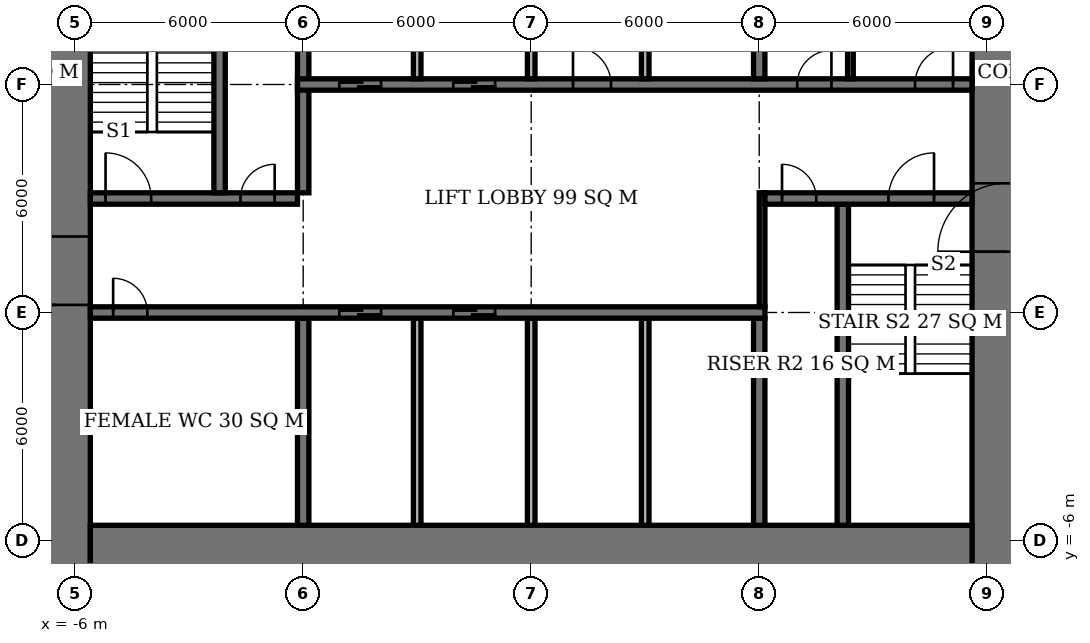
"""IFC4 building model, lengths in metres.
Left out: names, types, materials, properties, quantities, classifications, styles, units other than length and angle.
Written with IfcOpenShell. Run it as: python <this file> out.ifc"""

import sys

from ifc_helpers import new_model, si_unit, direction, frame, frame_2d, origin, place, context, subcontext, project, spatial, rectangle, extrude, element, fill, save


model = new_model("IFC4")
c1 = context("Model", 3, precision=1e-05, world=origin(), true_north=direction((0.0, 1.0)))
c2 = subcontext(c1, "Body", "Model", "MODEL_VIEW")
j1 = project(units=[si_unit("LENGTHUNIT", "METRE"), si_unit("PLANEANGLEUNIT", "RADIAN")], contexts=[c1])
p1 = place(None, origin())
s1 = spatial("IfcSite", under=j1, at=p1, CompositionType="ELEMENT")
p2 = place(p1, origin())
s2 = spatial("IfcBuilding", under=s1, at=p2, CompositionType="ELEMENT")
p3 = place(p2, frame((0.0, 0.0, 144.5)))
s3 = spatial("IfcBuildingStorey", under=s2, at=p3, CompositionType="ELEMENT", Elevation=144.5)
p4 = place(p3, frame((-5.6, -6.6, 0.0), z_axis=(0.0, 0.0, 1.0), x_axis=(1.0, 0.0, 0.0)))
e1 = element("IfcWall", 1, at=p4, inside=s3, PredefinedType="SHEAR", context=c2, shape_type="SweptSolid", body=[
    extrude(rectangle(XDim=23.2, YDim=2.0, at=frame_2d((11.6, 0.0))), origin(), (0.0, 0.0, 1.0), 3.9),
])
p5 = place(p3, frame((-6.5, -7.6, 0.0), z_axis=(0.0, 0.0, 1.0), x_axis=(0.0, 1.0, 0.0)))
e2 = element("IfcWall", 2, at=p5, inside=s3, PredefinedType="SHEAR", context=c2, shape_type="SweptSolid", body=[
    extrude(rectangle(XDim=21.2, YDim=1.8, at=frame_2d((10.6, 0.0))), origin(), (0.0, 0.0, 1.0), 3.9),
])
p6 = place(p5, frame((7.8, 0.0, 0.0)))
e3 = element("IfcOpeningElement", 3, at=p6, cuts=e2, PredefinedType="OPENING", context=c2, shape_type="SweptSolid", body=[
    extrude(rectangle(XDim=1.8, YDim=2.4, at=frame_2d((0.9, 1.2))), frame((0.0, 0.91, 0.0), z_axis=(0.0, -1.0, 0.0), x_axis=(1.0, 0.0, 0.0)), (0.0, 0.0, 1.0), 1.82),
])
p7 = place(p3, frame((18.5, -7.6, 0.0), z_axis=(0.0, 0.0, 1.0), x_axis=(0.0, 1.0, 0.0)))
e4 = element("IfcWall", 4, at=p7, inside=s3, PredefinedType="SHEAR", context=c2, shape_type="SweptSolid", body=[
    extrude(rectangle(XDim=21.2, YDim=1.8, at=frame_2d((10.6, 0.0))), origin(), (0.0, 0.0, 1.0), 3.9),
])
p8 = place(p7, frame((9.2, 0.0, 0.0)))
e5 = element("IfcOpeningElement", 5, at=p8, cuts=e4, PredefinedType="OPENING", context=c2, shape_type="SweptSolid", body=[
    extrude(rectangle(XDim=1.8, YDim=2.4, at=frame_2d((0.9, 1.2))), frame((0.0, 0.91, 0.0), z_axis=(0.0, -1.0, 0.0), x_axis=(1.0, 0.0, 0.0)), (0.0, 0.0, 1.0), 1.82),
])
p9 = place(p3, frame((-5.6, 0.0, 0.0), z_axis=(0.0, 0.0, 1.0), x_axis=(1.0, 0.0, 0.0)))
e6 = element("IfcWall", 6, at=p9, inside=s3, PredefinedType="SHEAR", context=c2, shape_type="SweptSolid", body=[
    extrude(rectangle(XDim=17.75, YDim=0.3, at=frame_2d((8.875, 0.0))), origin(), (0.0, 0.0, 1.0), 3.9),
])
p10 = place(p9, frame((0.6, 0.0, 0.0)))
e7 = element("IfcOpeningElement", 7, at=p10, cuts=e6, PredefinedType="OPENING", context=c2, shape_type="SweptSolid", body=[
    extrude(rectangle(XDim=0.9, YDim=2.1, at=frame_2d((0.45, 1.05))), frame((0.0, 0.16, 0.0), z_axis=(0.0, -1.0, 0.0), x_axis=(1.0, 0.0, 0.0)), (0.0, 0.0, 1.0), 0.32),
])
p11 = place(p9, frame((6.55, 0.0, 0.0)))
e8 = element("IfcOpeningElement", 8, at=p11, cuts=e6, PredefinedType="OPENING", context=c2, shape_type="SweptSolid", body=[
    extrude(rectangle(XDim=1.1, YDim=2.1, at=frame_2d((0.55, 1.05))), frame((0.0, 0.16, 0.0), z_axis=(0.0, -1.0, 0.0), x_axis=(1.0, 0.0, 0.0)), (0.0, 0.0, 1.0), 0.32),
])
p12 = place(p9, frame((9.55, 0.0, 0.0)))
e9 = element("IfcOpeningElement", 9, at=p12, cuts=e6, PredefinedType="OPENING", context=c2, shape_type="SweptSolid", body=[
    extrude(rectangle(XDim=1.1, YDim=2.1, at=frame_2d((0.55, 1.05))), frame((0.0, 0.16, 0.0), z_axis=(0.0, -1.0, 0.0), x_axis=(1.0, 0.0, 0.0)), (0.0, 0.0, 1.0), 0.32),
])
p13 = place(p3, frame((-5.6, 3.0, 0.0), z_axis=(0.0, 0.0, 1.0), x_axis=(1.0, 0.0, 0.0)))
e10 = element("IfcWall", 10, at=p13, inside=s3, PredefinedType="SHEAR", context=c2, shape_type="SweptSolid", body=[
    extrude(rectangle(XDim=5.45, YDim=0.3, at=frame_2d((2.725, 0.0))), origin(), (0.0, 0.0, 1.0), 3.9),
])
p14 = place(p13, frame((0.4, 0.0, 0.0)))
e11 = element("IfcOpeningElement", 11, at=p14, cuts=e10, PredefinedType="OPENING", context=c2, shape_type="SweptSolid", body=[
    extrude(rectangle(XDim=1.2, YDim=2.1, at=frame_2d((0.6, 1.05))), frame((0.0, 0.16, 0.0), z_axis=(0.0, -1.0, 0.0), x_axis=(1.0, 0.0, 0.0)), (0.0, 0.0, 1.0), 0.32),
])
p15 = place(p13, frame((3.95, 0.0, 0.0)))
e12 = element("IfcOpeningElement", 12, at=p15, cuts=e10, PredefinedType="OPENING", context=c2, shape_type="SweptSolid", body=[
    extrude(rectangle(XDim=0.9, YDim=2.1, at=frame_2d((0.45, 1.05))), frame((0.0, 0.16, 0.0), z_axis=(0.0, -1.0, 0.0), x_axis=(1.0, 0.0, 0.0)), (0.0, 0.0, 1.0), 0.32),
])
p16 = place(p3, frame((12.15, 3.0, 0.0), z_axis=(0.0, 0.0, 1.0), x_axis=(1.0, 0.0, 0.0)))
e13 = element("IfcWall", 13, at=p16, inside=s3, PredefinedType="SHEAR", context=c2, shape_type="SweptSolid", body=[
    extrude(rectangle(XDim=5.45, YDim=0.3, at=frame_2d((2.725, 0.0))), origin(), (0.0, 0.0, 1.0), 3.9),
])
p17 = place(p16, frame((3.25, 0.0, 0.0)))
e14 = element("IfcOpeningElement", 14, at=p17, cuts=e13, PredefinedType="OPENING", context=c2, shape_type="SweptSolid", body=[
    extrude(rectangle(XDim=1.2, YDim=2.1, at=frame_2d((0.6, 1.05))), frame((0.0, 0.16, 0.0), z_axis=(0.0, -1.0, 0.0), x_axis=(1.0, 0.0, 0.0)), (0.0, 0.0, 1.0), 0.32),
])
p18 = place(p16, frame((0.45, 0.0, 0.0)))
e15 = element("IfcOpeningElement", 15, at=p18, cuts=e13, PredefinedType="OPENING", context=c2, shape_type="SweptSolid", body=[
    extrude(rectangle(XDim=0.9, YDim=2.1, at=frame_2d((0.45, 1.05))), frame((0.0, 0.16, 0.0), z_axis=(0.0, -1.0, 0.0), x_axis=(1.0, 0.0, 0.0)), (0.0, 0.0, 1.0), 0.32),
])
p19 = place(p3, frame((-0.15, 6.0, 0.0), z_axis=(0.0, 0.0, 1.0), x_axis=(1.0, 0.0, 0.0)))
e16 = element("IfcWall", 16, at=p19, inside=s3, PredefinedType="SHEAR", context=c2, shape_type="SweptSolid", body=[
    extrude(rectangle(XDim=17.75, YDim=0.3, at=frame_2d((8.875, 0.0))), origin(), (0.0, 0.0, 1.0), 3.9),
])
p20 = place(p19, frame((13.15, 0.0, 0.0)))
e17 = element("IfcOpeningElement", 17, at=p20, cuts=e16, PredefinedType="OPENING", context=c2, shape_type="SweptSolid", body=[
    extrude(rectangle(XDim=0.9, YDim=2.1, at=frame_2d((0.45, 1.05))), frame((0.0, 0.16, 0.0), z_axis=(0.0, -1.0, 0.0), x_axis=(1.0, 0.0, 0.0)), (0.0, 0.0, 1.0), 0.32),
])
p21 = place(p19, frame((16.25, 0.0, 0.0)))
e18 = element("IfcOpeningElement", 18, at=p21, cuts=e16, PredefinedType="OPENING", context=c2, shape_type="SweptSolid", body=[
    extrude(rectangle(XDim=1.0, YDim=2.1, at=frame_2d((0.5, 1.05))), frame((0.0, 0.16, 0.0), z_axis=(0.0, -1.0, 0.0), x_axis=(1.0, 0.0, 0.0)), (0.0, 0.0, 1.0), 0.32),
])
p22 = place(p19, frame((7.25, 0.0, 0.0)))
e19 = element("IfcOpeningElement", 19, at=p22, cuts=e16, PredefinedType="OPENING", context=c2, shape_type="SweptSolid", body=[
    extrude(rectangle(XDim=1.0, YDim=2.1, at=frame_2d((0.5, 1.05))), frame((0.0, 0.16, 0.0), z_axis=(0.0, -1.0, 0.0), x_axis=(1.0, 0.0, 0.0)), (0.0, 0.0, 1.0), 0.32),
])
p23 = place(p19, frame((1.1, 0.0, 0.0)))
e20 = element("IfcOpeningElement", 20, at=p23, cuts=e16, PredefinedType="OPENING", context=c2, shape_type="SweptSolid", body=[
    extrude(rectangle(XDim=1.1, YDim=2.1, at=frame_2d((0.55, 1.05))), frame((0.0, 0.16, 0.0), z_axis=(0.0, -1.0, 0.0), x_axis=(1.0, 0.0, 0.0)), (0.0, 0.0, 1.0), 0.32),
])
p24 = place(p19, frame((4.1, 0.0, 0.0)))
e21 = element("IfcOpeningElement", 21, at=p24, cuts=e16, PredefinedType="OPENING", context=c2, shape_type="SweptSolid", body=[
    extrude(rectangle(XDim=1.1, YDim=2.1, at=frame_2d((0.55, 1.05))), frame((0.0, 0.16, 0.0), z_axis=(0.0, -1.0, 0.0), x_axis=(1.0, 0.0, 0.0)), (0.0, 0.0, 1.0), 0.32),
])
p25 = place(p3, frame((0.0, -5.6, 0.0), z_axis=(0.0, 0.0, 1.0), x_axis=(0.0, 1.0, 0.0)))
e22 = element("IfcWall", 22, at=p25, inside=s3, PredefinedType="SHEAR", context=c2, shape_type="SweptSolid", body=[
    extrude(rectangle(XDim=5.45, YDim=0.3, at=frame_2d((2.725, 0.0))), origin(), (0.0, 0.0, 1.0), 3.9),
])
p26 = place(p3, frame((0.0, 3.15, 0.0), z_axis=(0.0, 0.0, 1.0), x_axis=(0.0, 1.0, 0.0)))
e23 = element("IfcWall", 23, at=p26, inside=s3, PredefinedType="SHEAR", context=c2, shape_type="SweptSolid", body=[
    extrude(rectangle(XDim=8.45, YDim=0.3, at=frame_2d((4.225, 0.0))), origin(), (0.0, 0.0, 1.0), 3.9),
])
for number, where, z_axis, x_axis in (
    (24, (12.0, -5.6, 0.0), (0.0, 0.0, 1.0), (0.0, 1.0, 0.0)),
    (25, (12.0, 6.15, 0.0), (0.0, 0.0, 1.0), (0.0, 1.0, 0.0)),
):
    element("IfcWall", number, at=place(p3, frame(where, z_axis=z_axis, x_axis=x_axis)), inside=s3, PredefinedType="SHEAR", context=c2, shape_type="SweptSolid", body=[
        extrude(rectangle(XDim=5.45, YDim=0.3, at=frame_2d((2.725, 0.0))), origin(), (0.0, 0.0, 1.0), 3.9),
    ])
for number, where, z_axis, x_axis in (
    (26, (-2.2, 3.15, 0.0), (0.0, 0.0, 1.0), (0.0, 1.0, 0.0)),
    (27, (14.2, -5.6, 0.0), (0.0, 0.0, 1.0), (0.0, 1.0, 0.0)),
):
    element("IfcWall", number, at=place(p3, frame(where, z_axis=z_axis, x_axis=x_axis)), inside=s3, PredefinedType="SHEAR", context=c2, shape_type="SweptSolid", body=[
        extrude(rectangle(XDim=8.45, YDim=0.3, at=frame_2d((4.225, 0.0))), origin(), (0.0, 0.0, 1.0), 3.9),
    ])
for number, where, z_axis, x_axis in (
    (28, (3.0, 6.15, 0.0), (0.0, 0.0, 1.0), (0.0, 1.0, 0.0)),
    (29, (6.0, 6.15, 0.0), (0.0, 0.0, 1.0), (0.0, 1.0, 0.0)),
    (30, (9.0, 6.15, 0.0), (0.0, 0.0, 1.0), (0.0, 1.0, 0.0)),
    (31, (3.0, -5.6, 0.0), (0.0, 0.0, 1.0), (0.0, 1.0, 0.0)),
    (32, (6.0, -5.6, 0.0), (0.0, 0.0, 1.0), (0.0, 1.0, 0.0)),
    (33, (9.0, -5.6, 0.0), (0.0, 0.0, 1.0), (0.0, 1.0, 0.0)),
):
    element("IfcWall", number, at=place(p3, frame(where, z_axis=z_axis, x_axis=x_axis)), inside=s3, PredefinedType="SOLIDWALL", context=c2, shape_type="SweptSolid", body=[
        extrude(rectangle(XDim=5.45, YDim=0.2, at=frame_2d((2.725, 0.0))), origin(), (0.0, 0.0, 1.0), 3.9),
    ])
p27 = place(p3, frame((14.4, 6.15, 0.0), z_axis=(0.0, 0.0, 1.0), x_axis=(0.0, 1.0, 0.0)))
e34 = element("IfcWall", 34, at=p27, inside=s3, PredefinedType="PLUMBINGWALL", context=c2, shape_type="SweptSolid", body=[
    extrude(rectangle(XDim=5.45, YDim=0.15, at=frame_2d((2.725, 0.0))), origin(), (0.0, 0.0, 1.0), 3.65),
])
p28 = place(p3, frame((12.075, 0.15, 0.0), z_axis=(0.0, 0.0, 1.0), x_axis=(0.0, 1.0, 0.0)))
e35 = element("IfcWall", 35, at=p28, inside=s3, PredefinedType="PARTITIONING", context=c2, shape_type="SweptSolid", body=[
    extrude(rectangle(XDim=3.0, YDim=0.15, at=frame_2d((1.5, 0.0))), origin(), (0.0, 0.0, 1.0), 3.65),
])
p29 = place(p6, origin())
e36 = element("IfcDoor", 36, at=p29, inside=s3, OperationType="DOUBLE_DOOR_SINGLE_SWING", PredefinedType="DOOR", context=c2, shape_type="SweptSolid", body=[
    extrude(rectangle(XDim=1.8, YDim=2.4, at=frame_2d((0.9, 1.2))), frame((0.0, 0.025, 0.0), z_axis=(0.0, -1.0, 0.0), x_axis=(1.0, 0.0, 0.0)), (0.0, 0.0, 1.0), 0.05),
])
fill(e3, e36)
p30 = place(p8, origin())
e37 = element("IfcDoor", 37, at=p30, inside=s3, OperationType="DOUBLE_DOOR_SINGLE_SWING", PredefinedType="DOOR", context=c2, shape_type="SweptSolid", body=[
    extrude(rectangle(XDim=1.8, YDim=2.4, at=frame_2d((0.9, 1.2))), frame((0.0, 0.025, 0.0), z_axis=(0.0, -1.0, 0.0), x_axis=(1.0, 0.0, 0.0)), (0.0, 0.0, 1.0), 0.05),
])
fill(e5, e37)
p31 = place(p14, origin())
e38 = element("IfcDoor", 38, at=p31, inside=s3, OperationType="SINGLE_SWING_LEFT", PredefinedType="DOOR", context=c2, shape_type="SweptSolid", body=[
    extrude(rectangle(XDim=1.2, YDim=2.1, at=frame_2d((0.6, 1.05))), frame((0.0, 0.025, 0.0), z_axis=(0.0, -1.0, 0.0), x_axis=(1.0, 0.0, 0.0)), (0.0, 0.0, 1.0), 0.05),
])
fill(e11, e38)
p32 = place(p15, origin())
e39 = element("IfcDoor", 39, at=p32, inside=s3, OperationType="SINGLE_SWING_RIGHT", PredefinedType="DOOR", context=c2, shape_type="SweptSolid", body=[
    extrude(rectangle(XDim=0.9, YDim=2.1, at=frame_2d((0.45, 1.05))), frame((0.0, 0.025, 0.0), z_axis=(0.0, -1.0, 0.0), x_axis=(1.0, 0.0, 0.0)), (0.0, 0.0, 1.0), 0.05),
])
fill(e12, e39)
p33 = place(p17, origin())
e40 = element("IfcDoor", 40, at=p33, inside=s3, OperationType="SINGLE_SWING_RIGHT", PredefinedType="DOOR", context=c2, shape_type="SweptSolid", body=[
    extrude(rectangle(XDim=1.2, YDim=2.1, at=frame_2d((0.6, 1.05))), frame((0.0, 0.025, 0.0), z_axis=(0.0, -1.0, 0.0), x_axis=(1.0, 0.0, 0.0)), (0.0, 0.0, 1.0), 0.05),
])
fill(e14, e40)
p34 = place(p18, origin())
e41 = element("IfcDoor", 41, at=p34, inside=s3, OperationType="SINGLE_SWING_LEFT", PredefinedType="DOOR", context=c2, shape_type="SweptSolid", body=[
    extrude(rectangle(XDim=0.9, YDim=2.1, at=frame_2d((0.45, 1.05))), frame((0.0, 0.025, 0.0), z_axis=(0.0, -1.0, 0.0), x_axis=(1.0, 0.0, 0.0)), (0.0, 0.0, 1.0), 0.05),
])
fill(e15, e41)
p35 = place(p10, origin())
e42 = element("IfcDoor", 42, at=p35, inside=s3, OperationType="SINGLE_SWING_LEFT", PredefinedType="DOOR", context=c2, shape_type="SweptSolid", body=[
    extrude(rectangle(XDim=0.9, YDim=2.1, at=frame_2d((0.45, 1.05))), frame((0.0, 0.025, 0.0), z_axis=(0.0, -1.0, 0.0), x_axis=(1.0, 0.0, 0.0)), (0.0, 0.0, 1.0), 0.05),
])
fill(e7, e42)
p36 = place(p20, origin())
e43 = element("IfcDoor", 43, at=p36, inside=s3, OperationType="SINGLE_SWING_RIGHT", PredefinedType="DOOR", context=c2, shape_type="SweptSolid", body=[
    extrude(rectangle(XDim=0.9, YDim=2.1, at=frame_2d((0.45, 1.05))), frame((0.0, 0.025, 0.0), z_axis=(0.0, -1.0, 0.0), x_axis=(1.0, 0.0, 0.0)), (0.0, 0.0, 1.0), 0.05),
])
fill(e17, e43)
p37 = place(p21, origin())
e44 = element("IfcDoor", 44, at=p37, inside=s3, OperationType="SINGLE_SWING_RIGHT", PredefinedType="DOOR", context=c2, shape_type="SweptSolid", body=[
    extrude(rectangle(XDim=1.0, YDim=2.1, at=frame_2d((0.5, 1.05))), frame((0.0, 0.025, 0.0), z_axis=(0.0, -1.0, 0.0), x_axis=(1.0, 0.0, 0.0)), (0.0, 0.0, 1.0), 0.05),
])
fill(e18, e44)
p38 = place(p22, origin())
e45 = element("IfcDoor", 45, at=p38, inside=s3, OperationType="SINGLE_SWING_LEFT", PredefinedType="DOOR", context=c2, shape_type="SweptSolid", body=[
    extrude(rectangle(XDim=1.0, YDim=2.1, at=frame_2d((0.5, 1.05))), frame((0.0, 0.025, 0.0), z_axis=(0.0, -1.0, 0.0), x_axis=(1.0, 0.0, 0.0)), (0.0, 0.0, 1.0), 0.05),
])
fill(e19, e45)
p39 = place(p23, origin())
e46 = element("IfcDoor", 46, at=p39, inside=s3, OperationType="DOUBLE_DOOR_SLIDING", PredefinedType="USERDEFINED", context=c2, shape_type="SweptSolid", body=[
    extrude(rectangle(XDim=1.1, YDim=2.1, at=frame_2d((0.55, 1.05))), frame((0.0, 0.025, 0.0), z_axis=(0.0, -1.0, 0.0), x_axis=(1.0, 0.0, 0.0)), (0.0, 0.0, 1.0), 0.05),
])
fill(e20, e46)
p40 = place(p24, origin())
e47 = element("IfcDoor", 47, at=p40, inside=s3, OperationType="DOUBLE_DOOR_SLIDING", PredefinedType="USERDEFINED", context=c2, shape_type="SweptSolid", body=[
    extrude(rectangle(XDim=1.1, YDim=2.1, at=frame_2d((0.55, 1.05))), frame((0.0, 0.025, 0.0), z_axis=(0.0, -1.0, 0.0), x_axis=(1.0, 0.0, 0.0)), (0.0, 0.0, 1.0), 0.05),
])
fill(e21, e47)
p41 = place(p11, origin())
e48 = element("IfcDoor", 48, at=p41, inside=s3, OperationType="DOUBLE_DOOR_SLIDING", PredefinedType="USERDEFINED", context=c2, shape_type="SweptSolid", body=[
    extrude(rectangle(XDim=1.1, YDim=2.1, at=frame_2d((0.55, 1.05))), frame((0.0, 0.025, 0.0), z_axis=(0.0, -1.0, 0.0), x_axis=(1.0, 0.0, 0.0)), (0.0, 0.0, 1.0), 0.05),
])
fill(e8, e48)
p42 = place(p12, origin())
e49 = element("IfcDoor", 49, at=p42, inside=s3, OperationType="DOUBLE_DOOR_SLIDING", PredefinedType="USERDEFINED", context=c2, shape_type="SweptSolid", body=[
    extrude(rectangle(XDim=1.1, YDim=2.1, at=frame_2d((0.55, 1.05))), frame((0.0, 0.025, 0.0), z_axis=(0.0, -1.0, 0.0), x_axis=(1.0, 0.0, 0.0)), (0.0, 0.0, 1.0), 0.05),
])
fill(e9, e49)
save(model, sys.argv[1])
